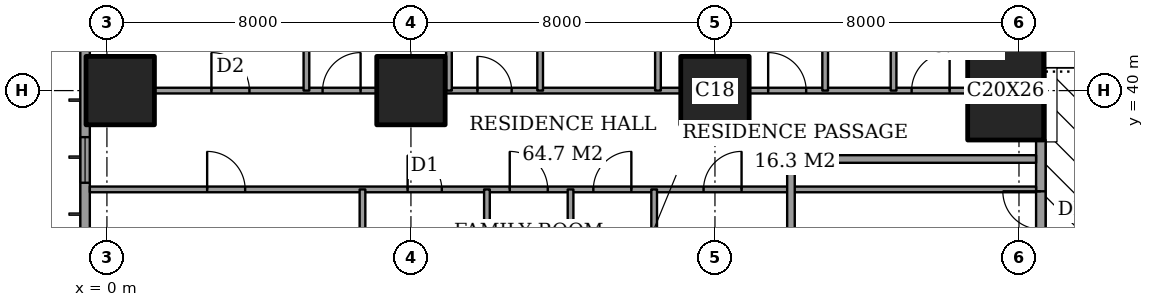
"""IFC4 building model, lengths in metres.
Left out: names, types, materials, properties, quantities, classifications, styles, units other than length and angle.
Written with IfcOpenShell. Run it as: python <this file> out.ifc"""

import sys

from ifc_helpers import new_model, si_unit, direction, frame, frame_2d, origin, origin_2d, place, context, subcontext, project, spatial, rectangle, extrude, element, fill, save


model = new_model("IFC4")
c1 = context("Model", 3, precision=1e-05, world=origin(), true_north=direction((0.0, 1.0)))
c2 = subcontext(c1, "Body", "Model", "MODEL_VIEW")
j1 = project(units=[si_unit("LENGTHUNIT", "METRE"), si_unit("PLANEANGLEUNIT", "RADIAN")], contexts=[c1])
p1 = place(None, origin())
s1 = spatial("IfcSite", under=j1, at=p1, CompositionType="ELEMENT")
p2 = place(p1, origin())
s2 = spatial("IfcBuilding", under=s1, at=p2, CompositionType="ELEMENT")
p3 = place(p2, frame((0.0, 0.0, 182.2)))
s3 = spatial("IfcBuildingStorey", under=s2, at=p3, CompositionType="ELEMENT", Elevation=182.2)
for number, where, z_axis, x_axis in (
    (1, (0.35, 40.0, 0.0), (0.0, 0.0, 1.0), (1.0, 0.0, 0.0)),
    (2, (8.0, 40.0, 0.0), (0.0, 0.0, 1.0), (1.0, 0.0, 0.0)),
    (3, (16.0, 40.0, 0.0), (0.0, 0.0, 1.0), (1.0, 0.0, 0.0)),
):
    element("IfcColumn", number, at=place(p3, frame(where, z_axis=z_axis, x_axis=x_axis)), inside=s3, PredefinedType="COLUMN", context=c2, shape_type="SweptSolid", body=[
        extrude(rectangle(XDim=1.8, YDim=1.8, at=origin_2d()), origin(), (0.0, 0.0, 1.0), 3.6),
    ])
p4 = place(p3, frame((23.65, 40.0, 0.0), z_axis=(0.0, 0.0, 1.0), x_axis=(1.0, 0.0, 0.0)))
e4 = element("IfcColumn", 4, at=p4, inside=s3, PredefinedType="COLUMN", context=c2, shape_type="SweptSolid", body=[
    extrude(rectangle(XDim=2.0, YDim=2.6, at=origin_2d()), origin(), (0.0, 0.0, 1.0), 3.6),
])
p5 = place(p3, frame((24.575, 35.0, 0.0), z_axis=(0.0, 0.0, 1.0), x_axis=(0.0, 1.0, 0.0)))
e5 = element("IfcWall", 5, at=p5, inside=s3, PredefinedType="SOLIDWALL", context=c2, shape_type="SweptSolid", body=[
    extrude(rectangle(XDim=3.7, YDim=0.25, at=frame_2d((1.85, 0.0))), origin(), (0.0, 0.0, 1.0), 3.6),
])
p6 = place(p5, frame((1.35, 0.0, 0.0)))
e6 = element("IfcOpeningElement", 6, at=p6, cuts=e5, PredefinedType="OPENING", context=c2, shape_type="SweptSolid", body=[
    extrude(rectangle(XDim=1.0, YDim=2.1, at=frame_2d((0.5, 1.05))), frame((0.0, 0.135, 0.0), z_axis=(0.0, -1.0, 0.0), x_axis=(1.0, 0.0, 0.0)), (0.0, 0.0, 1.0), 0.27),
])
p7 = place(p3, frame((-0.575, 44.825, 0.0), z_axis=(0.0, 0.0, 1.0), x_axis=(0.0, -1.0, 0.0)))
e7 = element("IfcWall", 7, at=p7, inside=s3, PredefinedType="SOLIDWALL", context=c2, shape_type="SweptSolid", body=[
    extrude(rectangle(XDim=41.65, YDim=0.25, at=frame_2d((20.825, 0.0))), origin(), (0.0, 0.0, 1.0), 3.6),
])
p8 = place(p7, frame((0.825, 0.0, 0.2)))
e8 = element("IfcOpeningElement", 8, at=p8, cuts=e7, PredefinedType="OPENING", context=c2, shape_type="SweptSolid", body=[
    extrude(rectangle(XDim=2.4, YDim=2.4, at=frame_2d((1.2, 1.2))), frame((0.0, 0.135, 0.0), z_axis=(0.0, -1.0, 0.0), x_axis=(1.0, 0.0, 0.0)), (0.0, 0.0, 1.0), 0.27),
])
p9 = place(p7, frame((6.05, 0.0, 0.2)))
e9 = element("IfcOpeningElement", 9, at=p9, cuts=e7, PredefinedType="OPENING", context=c2, shape_type="SweptSolid", body=[
    extrude(rectangle(XDim=1.2, YDim=2.4, at=frame_2d((0.6, 1.2))), frame((0.0, 0.135, 0.0), z_axis=(0.0, -1.0, 0.0), x_axis=(1.0, 0.0, 0.0)), (0.0, 0.0, 1.0), 0.27),
])
p10 = place(p7, frame((8.475, 0.0, 0.2)))
e10 = element("IfcOpeningElement", 10, at=p10, cuts=e7, PredefinedType="OPENING", context=c2, shape_type="SweptSolid", body=[
    extrude(rectangle(XDim=2.4, YDim=2.4, at=frame_2d((1.2, 1.2))), frame((0.0, 0.135, 0.0), z_axis=(0.0, -1.0, 0.0), x_axis=(1.0, 0.0, 0.0)), (0.0, 0.0, 1.0), 0.27),
])
p11 = place(p7, frame((15.625, 0.0, 0.2)))
e11 = element("IfcOpeningElement", 11, at=p11, cuts=e7, PredefinedType="OPENING", context=c2, shape_type="SweptSolid", body=[
    extrude(rectangle(XDim=2.4, YDim=2.4, at=frame_2d((1.2, 1.2))), frame((0.0, 0.135, 0.0), z_axis=(0.0, -1.0, 0.0), x_axis=(1.0, 0.0, 0.0)), (0.0, 0.0, 1.0), 0.27),
])
p12 = place(p7, frame((23.625, 0.0, 0.2)))
e12 = element("IfcOpeningElement", 12, at=p12, cuts=e7, PredefinedType="OPENING", context=c2, shape_type="SweptSolid", body=[
    extrude(rectangle(XDim=2.4, YDim=2.4, at=frame_2d((1.2, 1.2))), frame((0.0, 0.135, 0.0), z_axis=(0.0, -1.0, 0.0), x_axis=(1.0, 0.0, 0.0)), (0.0, 0.0, 1.0), 0.27),
])
p13 = place(p7, frame((30.775, 0.0, 0.2)))
e13 = element("IfcOpeningElement", 13, at=p13, cuts=e7, PredefinedType="OPENING", context=c2, shape_type="SweptSolid", body=[
    extrude(rectangle(XDim=2.4, YDim=2.4, at=frame_2d((1.2, 1.2))), frame((0.0, 0.135, 0.0), z_axis=(0.0, -1.0, 0.0), x_axis=(1.0, 0.0, 0.0)), (0.0, 0.0, 1.0), 0.27),
])
p14 = place(p7, frame((34.55, 0.0, 0.2)))
e14 = element("IfcOpeningElement", 14, at=p14, cuts=e7, PredefinedType="OPENING", context=c2, shape_type="SweptSolid", body=[
    extrude(rectangle(XDim=1.2, YDim=2.4, at=frame_2d((0.6, 1.2))), frame((0.0, 0.135, 0.0), z_axis=(0.0, -1.0, 0.0), x_axis=(1.0, 0.0, 0.0)), (0.0, 0.0, 1.0), 0.27),
])
p15 = place(p7, frame((38.425, 0.0, 0.2)))
e15 = element("IfcOpeningElement", 15, at=p15, cuts=e7, PredefinedType="OPENING", context=c2, shape_type="SweptSolid", body=[
    extrude(rectangle(XDim=2.4, YDim=2.4, at=frame_2d((1.2, 1.2))), frame((0.0, 0.135, 0.0), z_axis=(0.0, -1.0, 0.0), x_axis=(1.0, 0.0, 0.0)), (0.0, 0.0, 1.0), 0.27),
])
p16 = place(p3, frame((-0.45, 37.4, 0.0), z_axis=(0.0, 0.0, 1.0), x_axis=(1.0, 0.0, 0.0)))
e16 = element("IfcWall", 16, at=p16, inside=s3, PredefinedType="PARTITIONING", context=c2, shape_type="SweptSolid", body=[
    extrude(rectangle(XDim=24.9, YDim=0.15, at=frame_2d((12.45, 0.0))), origin(), (0.0, 0.0, 1.0), 3.35),
])
p17 = place(p16, frame((13.25, 0.0, 0.0)))
e17 = element("IfcOpeningElement", 17, at=p17, cuts=e16, PredefinedType="OPENING", context=c2, shape_type="SweptSolid", body=[
    extrude(rectangle(XDim=1.0, YDim=2.1, at=frame_2d((0.5, 1.05))), frame((0.0, 0.085, 0.0), z_axis=(0.0, -1.0, 0.0), x_axis=(1.0, 0.0, 0.0)), (0.0, 0.0, 1.0), 0.17),
])
p18 = place(p16, frame((3.087, 0.0, 0.0)))
e18 = element("IfcOpeningElement", 18, at=p18, cuts=e16, PredefinedType="OPENING", context=c2, shape_type="SweptSolid", body=[
    extrude(rectangle(XDim=1.0, YDim=2.1, at=frame_2d((0.5, 1.05))), frame((0.0, 0.085, 0.0), z_axis=(0.0, -1.0, 0.0), x_axis=(1.0, 0.0, 0.0)), (0.0, 0.0, 1.0), 0.17),
])
p19 = place(p16, frame((8.363, 0.0, 0.0)))
e19 = element("IfcOpeningElement", 19, at=p19, cuts=e16, PredefinedType="OPENING", context=c2, shape_type="SweptSolid", body=[
    extrude(rectangle(XDim=0.9, YDim=2.1, at=frame_2d((0.45, 1.05))), frame((0.0, 0.085, 0.0), z_axis=(0.0, -1.0, 0.0), x_axis=(1.0, 0.0, 0.0)), (0.0, 0.0, 1.0), 0.17),
])
p20 = place(p16, frame((11.05, 0.0, 0.0)))
e20 = element("IfcOpeningElement", 20, at=p20, cuts=e16, PredefinedType="OPENING", context=c2, shape_type="SweptSolid", body=[
    extrude(rectangle(XDim=1.0, YDim=2.1, at=frame_2d((0.5, 1.05))), frame((0.0, 0.085, 0.0), z_axis=(0.0, -1.0, 0.0), x_axis=(1.0, 0.0, 0.0)), (0.0, 0.0, 1.0), 0.17),
])
p21 = place(p16, frame((16.15, 0.0, 0.0)))
e21 = element("IfcOpeningElement", 21, at=p21, cuts=e16, PredefinedType="OPENING", context=c2, shape_type="SweptSolid", body=[
    extrude(rectangle(XDim=1.0, YDim=2.1, at=frame_2d((0.5, 1.05))), frame((0.0, 0.085, 0.0), z_axis=(0.0, -1.0, 0.0), x_axis=(1.0, 0.0, 0.0)), (0.0, 0.0, 1.0), 0.17),
])
p22 = place(p3, frame((18.0, 38.2, 0.0), z_axis=(0.0, 0.0, 1.0), x_axis=(1.0, 0.0, 0.0)))
e22 = element("IfcWall", 22, at=p22, inside=s3, PredefinedType="PARTITIONING", context=c2, shape_type="SweptSolid", body=[
    extrude(rectangle(XDim=6.45, YDim=0.2, at=frame_2d((3.225, 0.0))), origin(), (0.0, 0.0, 1.0), 3.35),
])
p23 = place(p3, frame((1.25, 40.0, 0.0), z_axis=(0.0, 0.0, 1.0), x_axis=(1.0, 0.0, 0.0)))
e23 = element("IfcWall", 23, at=p23, inside=s3, PredefinedType="PARTITIONING", context=c2, shape_type="SweptSolid", body=[
    extrude(rectangle(XDim=5.85, YDim=0.15, at=frame_2d((2.925, 0.0))), origin(), (0.0, 0.0, 1.0), 3.35),
])
p24 = place(p23, frame((1.5, 0.0, 0.0)))
e24 = element("IfcOpeningElement", 24, at=p24, cuts=e23, PredefinedType="OPENING", context=c2, shape_type="SweptSolid", body=[
    extrude(rectangle(XDim=1.0, YDim=2.1, at=frame_2d((0.5, 1.05))), frame((0.0, 0.085, 0.0), z_axis=(0.0, -1.0, 0.0), x_axis=(1.0, 0.0, 0.0)), (0.0, 0.0, 1.0), 0.17),
])
p25 = place(p23, frame((4.425, 0.0, 0.0)))
e25 = element("IfcOpeningElement", 25, at=p25, cuts=e23, PredefinedType="OPENING", context=c2, shape_type="SweptSolid", body=[
    extrude(rectangle(XDim=1.0, YDim=2.1, at=frame_2d((0.5, 1.05))), frame((0.0, 0.085, 0.0), z_axis=(0.0, -1.0, 0.0), x_axis=(1.0, 0.0, 0.0)), (0.0, 0.0, 1.0), 0.17),
])
p26 = place(p3, frame((8.9, 40.0, 0.0), z_axis=(0.0, 0.0, 1.0), x_axis=(1.0, 0.0, 0.0)))
e26 = element("IfcWall", 26, at=p26, inside=s3, PredefinedType="PARTITIONING", context=c2, shape_type="SweptSolid", body=[
    extrude(rectangle(XDim=6.2, YDim=0.15, at=frame_2d((3.1, 0.0))), origin(), (0.0, 0.0, 1.0), 3.35),
])
p27 = place(p26, frame((0.85, 0.0, 0.0)))
e27 = element("IfcOpeningElement", 27, at=p27, cuts=e26, PredefinedType="OPENING", context=c2, shape_type="SweptSolid", body=[
    extrude(rectangle(XDim=0.9, YDim=2.1, at=frame_2d((0.45, 1.05))), frame((0.0, 0.085, 0.0), z_axis=(0.0, -1.0, 0.0), x_axis=(1.0, 0.0, 0.0)), (0.0, 0.0, 1.0), 0.17),
])
p28 = place(p3, frame((16.9, 40.0, 0.0), z_axis=(0.0, 0.0, 1.0), x_axis=(1.0, 0.0, 0.0)))
e28 = element("IfcWall", 28, at=p28, inside=s3, PredefinedType="PARTITIONING", context=c2, shape_type="SweptSolid", body=[
    extrude(rectangle(XDim=5.75, YDim=0.15, at=frame_2d((2.875, 0.0))), origin(), (0.0, 0.0, 1.0), 3.35),
])
p29 = place(p28, frame((0.5, 0.0, 0.0)))
e29 = element("IfcOpeningElement", 29, at=p29, cuts=e28, PredefinedType="OPENING", context=c2, shape_type="SweptSolid", body=[
    extrude(rectangle(XDim=1.0, YDim=2.1, at=frame_2d((0.5, 1.05))), frame((0.0, 0.085, 0.0), z_axis=(0.0, -1.0, 0.0), x_axis=(1.0, 0.0, 0.0)), (0.0, 0.0, 1.0), 0.17),
])
p30 = place(p28, frame((4.275, 0.0, 0.0)))
e30 = element("IfcOpeningElement", 30, at=p30, cuts=e28, PredefinedType="OPENING", context=c2, shape_type="SweptSolid", body=[
    extrude(rectangle(XDim=1.0, YDim=2.1, at=frame_2d((0.5, 1.05))), frame((0.0, 0.085, 0.0), z_axis=(0.0, -1.0, 0.0), x_axis=(1.0, 0.0, 0.0)), (0.0, 0.0, 1.0), 0.17),
])
p31 = place(p3, frame((5.25, 40.0, 0.0), z_axis=(0.0, 0.0, 1.0), x_axis=(0.0, 1.0, 0.0)))
e31 = element("IfcWall", 31, at=p31, inside=s3, PredefinedType="PARTITIONING", context=c2, shape_type="SweptSolid", body=[
    extrude(rectangle(XDim=8.45, YDim=0.15, at=frame_2d((4.225, 0.0))), origin(), (0.0, 0.0, 1.0), 3.35),
])
p32 = place(p3, frame((6.725, 33.2, 0.0), z_axis=(0.0, 0.0, 1.0), x_axis=(0.0, 1.0, 0.0)))
e32 = element("IfcWall", 32, at=p32, inside=s3, PredefinedType="PARTITIONING", context=c2, shape_type="SweptSolid", body=[
    extrude(rectangle(XDim=4.2, YDim=0.15, at=frame_2d((2.1, 0.0))), origin(), (0.0, 0.0, 1.0), 3.35),
])
p33 = place(p3, frame((9.0, 40.0, 0.0), z_axis=(0.0, 0.0, 1.0), x_axis=(0.0, 1.0, 0.0)))
e33 = element("IfcWall", 33, at=p33, inside=s3, PredefinedType="PARTITIONING", context=c2, shape_type="SweptSolid", body=[
    extrude(rectangle(XDim=8.45, YDim=0.15, at=frame_2d((4.225, 0.0))), origin(), (0.0, 0.0, 1.0), 3.35),
])
p34 = place(p3, frame((10.0, 28.0, 0.0), z_axis=(0.0, 0.0, 1.0), x_axis=(0.0, 1.0, 0.0)))
e34 = element("IfcWall", 34, at=p34, inside=s3, PredefinedType="PARTITIONING", context=c2, shape_type="SweptSolid", body=[
    extrude(rectangle(XDim=9.4, YDim=0.15, at=frame_2d((4.7, 0.0))), origin(), (0.0, 0.0, 1.0), 3.35),
])
p35 = place(p34, frame((0.5, 0.0, 0.0)))
e35 = element("IfcOpeningElement", 35, at=p35, cuts=e34, PredefinedType="OPENING", context=c2, shape_type="SweptSolid", body=[
    extrude(rectangle(XDim=1.0, YDim=2.1, at=frame_2d((0.5, 1.05))), frame((0.0, 0.085, 0.0), z_axis=(0.0, -1.0, 0.0), x_axis=(1.0, 0.0, 0.0)), (0.0, 0.0, 1.0), 0.17),
])
p36 = place(p3, frame((11.4, 40.0, 0.0), z_axis=(0.0, 0.0, 1.0), x_axis=(0.0, 1.0, 0.0)))
e36 = element("IfcWall", 36, at=p36, inside=s3, PredefinedType="PARTITIONING", context=c2, shape_type="SweptSolid", body=[
    extrude(rectangle(XDim=8.45, YDim=0.15, at=frame_2d((4.225, 0.0))), origin(), (0.0, 0.0, 1.0), 3.35),
])
for number, where, z_axis, x_axis in (
    (37, (12.2, 30.0, 0.0), (0.0, 0.0, 1.0), (0.0, 1.0, 0.0)),
    (38, (14.4, 30.0, 0.0), (0.0, 0.0, 1.0), (0.0, 1.0, 0.0)),
):
    element("IfcWall", number, at=place(p3, frame(where, z_axis=z_axis, x_axis=x_axis)), inside=s3, PredefinedType="PARTITIONING", context=c2, shape_type="SweptSolid", body=[
        extrude(rectangle(XDim=7.4, YDim=0.15, at=frame_2d((3.7, 0.0))), origin(), (0.0, 0.0, 1.0), 3.35),
    ])
p37 = place(p3, frame((14.5, 40.0, 0.0), z_axis=(0.0, 0.0, 1.0), x_axis=(0.0, 1.0, 0.0)))
e39 = element("IfcWall", 39, at=p37, inside=s3, PredefinedType="PARTITIONING", context=c2, shape_type="SweptSolid", body=[
    extrude(rectangle(XDim=8.45, YDim=0.15, at=frame_2d((4.225, 0.0))), origin(), (0.0, 0.0, 1.0), 3.35),
])
p38 = place(p37, frame((3.775, 0.0, 0.0)))
e40 = element("IfcOpeningElement", 40, at=p38, cuts=e39, PredefinedType="OPENING", context=c2, shape_type="SweptSolid", body=[
    extrude(rectangle(XDim=0.9, YDim=2.1, at=frame_2d((0.45, 1.05))), frame((0.0, 0.085, 0.0), z_axis=(0.0, -1.0, 0.0), x_axis=(1.0, 0.0, 0.0)), (0.0, 0.0, 1.0), 0.17),
])
p39 = place(p3, frame((18.0, 28.0, 0.0), z_axis=(0.0, 0.0, 1.0), x_axis=(0.0, 1.0, 0.0)))
e41 = element("IfcWall", 41, at=p39, inside=s3, PredefinedType="PARTITIONING", context=c2, shape_type="SweptSolid", body=[
    extrude(rectangle(XDim=10.2, YDim=0.2, at=frame_2d((5.1, 0.0))), origin(), (0.0, 0.0, 1.0), 3.35),
])
p40 = place(p3, frame((18.9, 40.0, 0.0), z_axis=(0.0, 0.0, 1.0), x_axis=(0.0, 1.0, 0.0)))
e42 = element("IfcWall", 42, at=p40, inside=s3, PredefinedType="PARTITIONING", context=c2, shape_type="SweptSolid", body=[
    extrude(rectangle(XDim=8.45, YDim=0.15, at=frame_2d((4.225, 0.0))), origin(), (0.0, 0.0, 1.0), 3.35),
])
p41 = place(p3, frame((20.7, 40.0, 0.0), z_axis=(0.0, 0.0, 1.0), x_axis=(0.0, 1.0, 0.0)))
e43 = element("IfcWall", 43, at=p41, inside=s3, PredefinedType="PARTITIONING", context=c2, shape_type="SweptSolid", body=[
    extrude(rectangle(XDim=8.45, YDim=0.15, at=frame_2d((4.225, 0.0))), origin(), (0.0, 0.0, 1.0), 3.35),
])
p42 = place(p41, frame((3.775, 0.0, 0.0)))
e44 = element("IfcOpeningElement", 44, at=p42, cuts=e43, PredefinedType="OPENING", context=c2, shape_type="SweptSolid", body=[
    extrude(rectangle(XDim=0.9, YDim=2.1, at=frame_2d((0.45, 1.05))), frame((0.0, 0.085, 0.0), z_axis=(0.0, -1.0, 0.0), x_axis=(1.0, 0.0, 0.0)), (0.0, 0.0, 1.0), 0.17),
])
p43 = place(p6, origin())
e45 = element("IfcDoor", 45, at=p43, inside=s3, OperationType="SINGLE_SWING_LEFT", PredefinedType="DOOR", context=c2, shape_type="SweptSolid", body=[
    extrude(rectangle(XDim=1.0, YDim=2.1, at=frame_2d((0.5, 1.05))), frame((0.0, 0.025, 0.0), z_axis=(0.0, -1.0, 0.0), x_axis=(1.0, 0.0, 0.0)), (0.0, 0.0, 1.0), 0.05),
])
fill(e6, e45)
p44 = place(p9, origin())
e46 = element("IfcWindow", 46, at=p44, inside=s3, PartitioningType="SINGLE_PANEL", PredefinedType="WINDOW", context=c2, shape_type="SweptSolid", body=[
    extrude(rectangle(XDim=1.2, YDim=2.4, at=frame_2d((0.6, 1.2))), frame((0.0, 0.03, 0.0), z_axis=(0.0, -1.0, 0.0), x_axis=(1.0, 0.0, 0.0)), (0.0, 0.0, 1.0), 0.06),
])
fill(e9, e46)
p45 = place(p24, origin())
e47 = element("IfcDoor", 47, at=p45, inside=s3, OperationType="SINGLE_SWING_RIGHT", PredefinedType="DOOR", context=c2, shape_type="SweptSolid", body=[
    extrude(rectangle(XDim=1.0, YDim=2.1, at=frame_2d((0.5, 1.05))), frame((0.0, 0.025, 0.0), z_axis=(0.0, -1.0, 0.0), x_axis=(1.0, 0.0, 0.0)), (0.0, 0.0, 1.0), 0.05),
])
fill(e24, e47)
p46 = place(p25, origin())
e48 = element("IfcDoor", 48, at=p46, inside=s3, OperationType="SINGLE_SWING_LEFT", PredefinedType="DOOR", context=c2, shape_type="SweptSolid", body=[
    extrude(rectangle(XDim=1.0, YDim=2.1, at=frame_2d((0.5, 1.05))), frame((0.0, 0.025, 0.0), z_axis=(0.0, -1.0, 0.0), x_axis=(1.0, 0.0, 0.0)), (0.0, 0.0, 1.0), 0.05),
])
fill(e25, e48)
p47 = place(p27, origin())
e49 = element("IfcDoor", 49, at=p47, inside=s3, OperationType="SINGLE_SWING_RIGHT", PredefinedType="DOOR", context=c2, shape_type="SweptSolid", body=[
    extrude(rectangle(XDim=0.9, YDim=2.1, at=frame_2d((0.45, 1.05))), frame((0.0, 0.025, 0.0), z_axis=(0.0, -1.0, 0.0), x_axis=(1.0, 0.0, 0.0)), (0.0, 0.0, 1.0), 0.05),
])
fill(e27, e49)
p48 = place(p29, origin())
e50 = element("IfcDoor", 50, at=p48, inside=s3, OperationType="SINGLE_SWING_RIGHT", PredefinedType="DOOR", context=c2, shape_type="SweptSolid", body=[
    extrude(rectangle(XDim=1.0, YDim=2.1, at=frame_2d((0.5, 1.05))), frame((0.0, 0.025, 0.0), z_axis=(0.0, -1.0, 0.0), x_axis=(1.0, 0.0, 0.0)), (0.0, 0.0, 1.0), 0.05),
])
fill(e29, e50)
p49 = place(p30, origin())
e51 = element("IfcDoor", 51, at=p49, inside=s3, OperationType="SINGLE_SWING_LEFT", PredefinedType="DOOR", context=c2, shape_type="SweptSolid", body=[
    extrude(rectangle(XDim=1.0, YDim=2.1, at=frame_2d((0.5, 1.05))), frame((0.0, 0.025, 0.0), z_axis=(0.0, -1.0, 0.0), x_axis=(1.0, 0.0, 0.0)), (0.0, 0.0, 1.0), 0.05),
])
fill(e30, e51)
p50 = place(p17, origin())
e52 = element("IfcDoor", 52, at=p50, inside=s3, OperationType="SINGLE_SWING_LEFT", PredefinedType="DOOR", context=c2, shape_type="SweptSolid", body=[
    extrude(rectangle(XDim=1.0, YDim=2.1, at=frame_2d((0.5, 1.05))), frame((0.0, 0.025, 0.0), z_axis=(0.0, -1.0, 0.0), x_axis=(1.0, 0.0, 0.0)), (0.0, 0.0, 1.0), 0.05),
])
fill(e17, e52)
p51 = place(p18, origin())
e53 = element("IfcDoor", 53, at=p51, inside=s3, OperationType="SINGLE_SWING_RIGHT", PredefinedType="DOOR", context=c2, shape_type="SweptSolid", body=[
    extrude(rectangle(XDim=1.0, YDim=2.1, at=frame_2d((0.5, 1.05))), frame((0.0, 0.025, 0.0), z_axis=(0.0, -1.0, 0.0), x_axis=(1.0, 0.0, 0.0)), (0.0, 0.0, 1.0), 0.05),
])
fill(e18, e53)
p52 = place(p19, origin())
e54 = element("IfcDoor", 54, at=p52, inside=s3, OperationType="SINGLE_SWING_RIGHT", PredefinedType="DOOR", context=c2, shape_type="SweptSolid", body=[
    extrude(rectangle(XDim=0.9, YDim=2.1, at=frame_2d((0.45, 1.05))), frame((0.0, 0.025, 0.0), z_axis=(0.0, -1.0, 0.0), x_axis=(1.0, 0.0, 0.0)), (0.0, 0.0, 1.0), 0.05),
])
fill(e19, e54)
p53 = place(p20, origin())
e55 = element("IfcDoor", 55, at=p53, inside=s3, OperationType="SINGLE_SWING_RIGHT", PredefinedType="DOOR", context=c2, shape_type="SweptSolid", body=[
    extrude(rectangle(XDim=1.0, YDim=2.1, at=frame_2d((0.5, 1.05))), frame((0.0, 0.025, 0.0), z_axis=(0.0, -1.0, 0.0), x_axis=(1.0, 0.0, 0.0)), (0.0, 0.0, 1.0), 0.05),
])
fill(e20, e55)
p54 = place(p21, origin())
e56 = element("IfcDoor", 56, at=p54, inside=s3, OperationType="SINGLE_SWING_LEFT", PredefinedType="DOOR", context=c2, shape_type="SweptSolid", body=[
    extrude(rectangle(XDim=1.0, YDim=2.1, at=frame_2d((0.5, 1.05))), frame((0.0, 0.025, 0.0), z_axis=(0.0, -1.0, 0.0), x_axis=(1.0, 0.0, 0.0)), (0.0, 0.0, 1.0), 0.05),
])
fill(e21, e56)
save(model, sys.argv[1])
